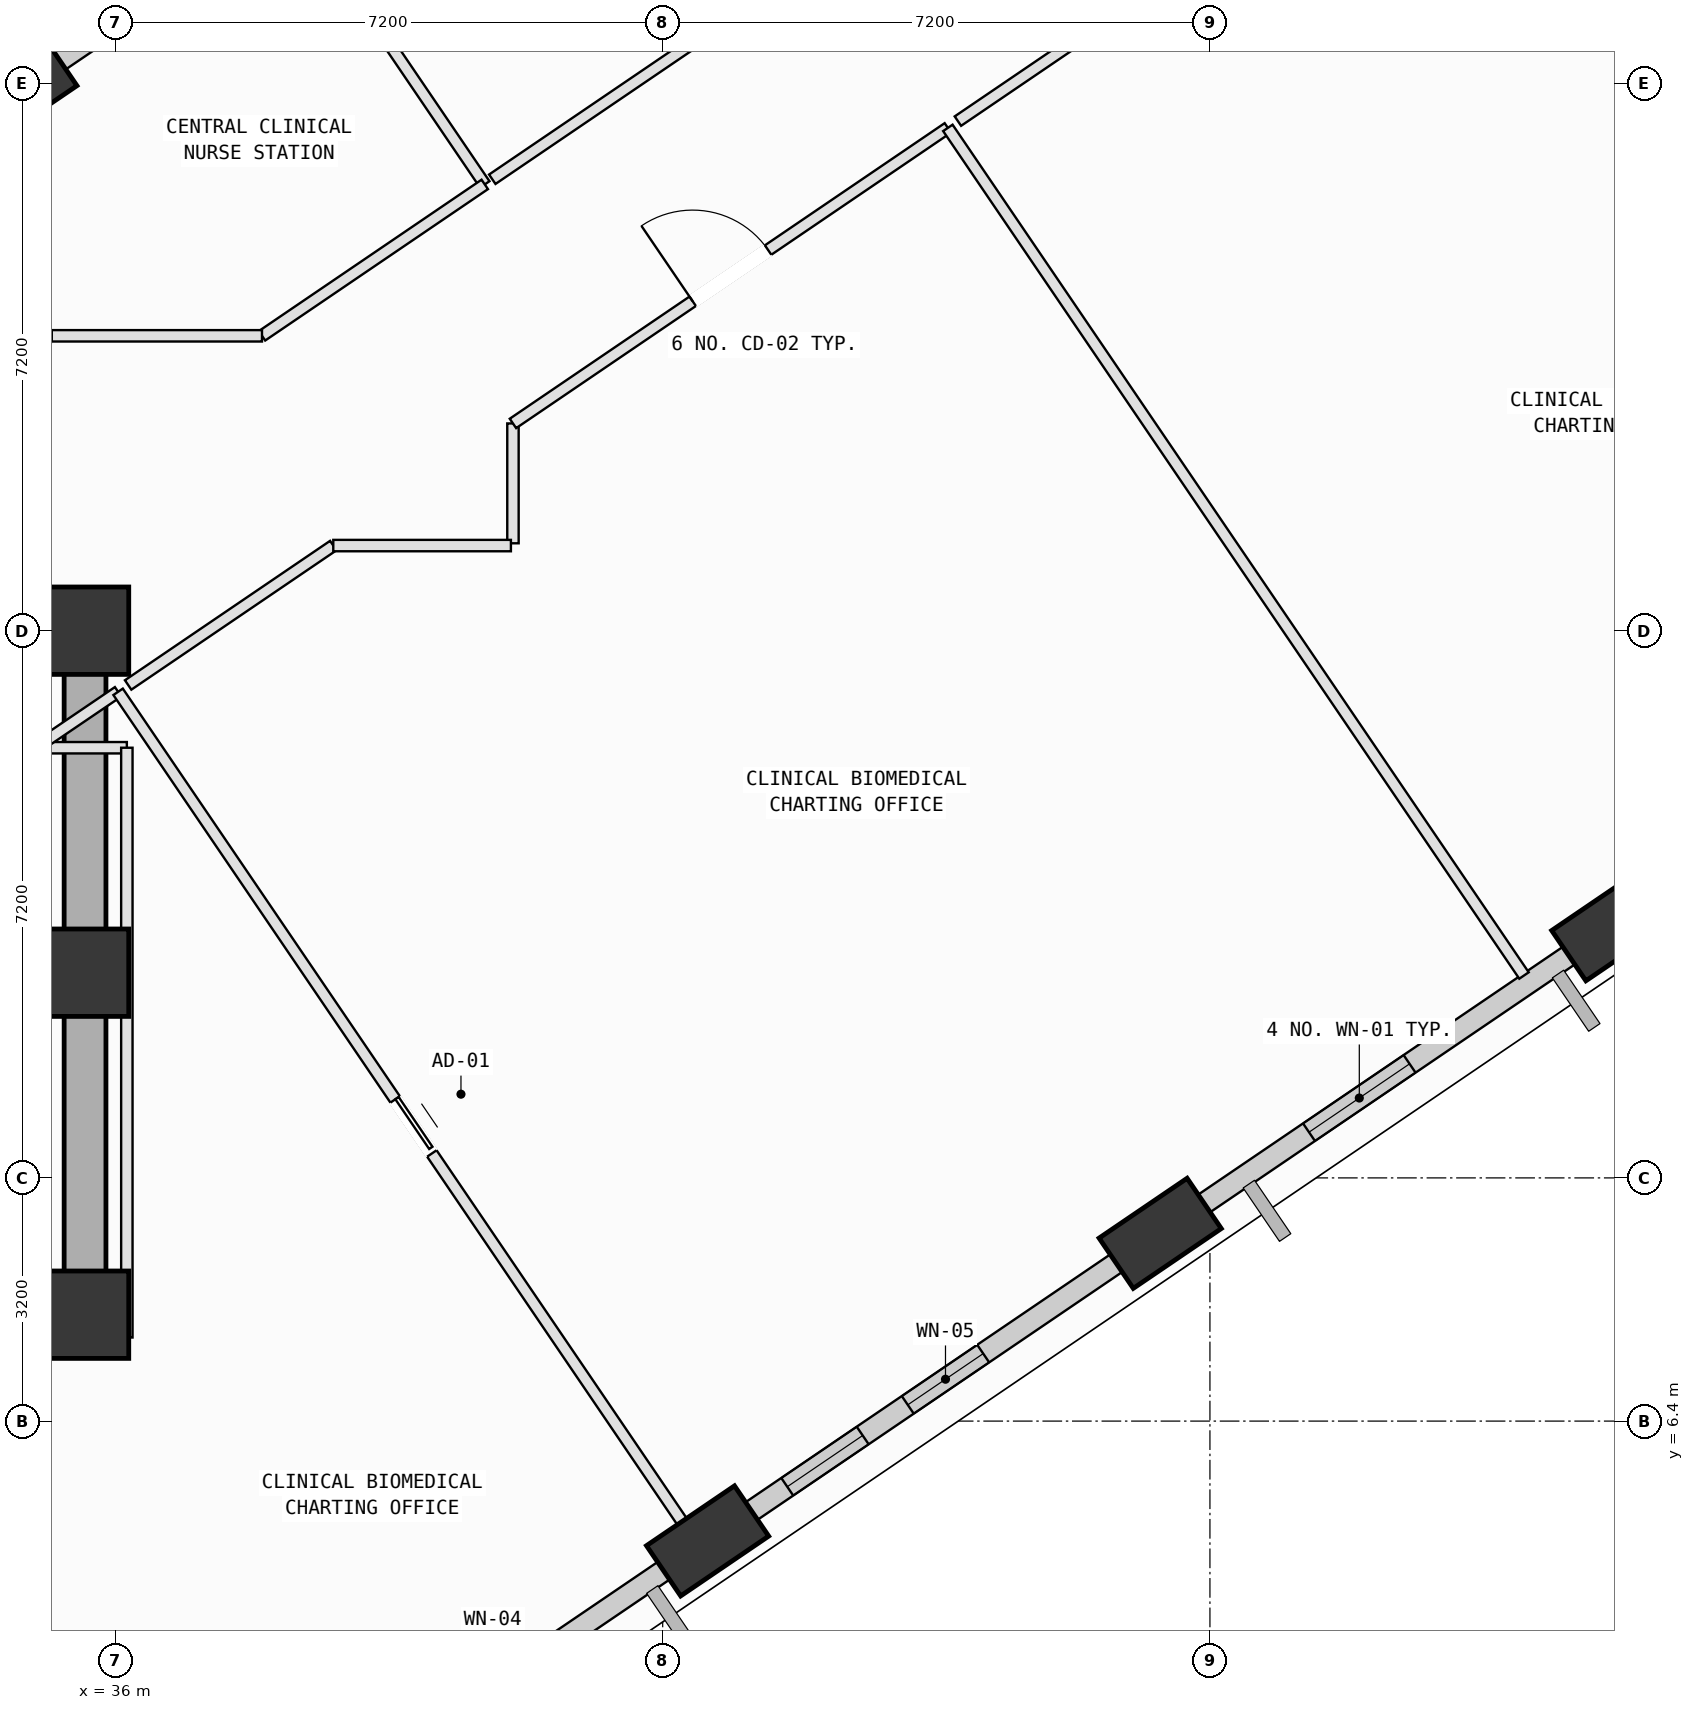
"""IFC4 building model, lengths in metres.
Left out: names, types, materials, properties, quantities, classifications, styles, units other than length and angle.
Written with IfcOpenShell. Run it as: python <this file> out.ifc"""

import sys

from ifc_helpers import new_model, si_unit, direction, frame, frame_2d, origin, origin_2d, place, context, subcontext, project, spatial, rectangle, extrude, element, fill, save


model = new_model("IFC4")
c1 = context("Model", 3, precision=1e-05, world=origin(), true_north=direction((0.0, 1.0)))
c2 = subcontext(c1, "Body", "Model", "MODEL_VIEW")
j1 = project(units=[si_unit("LENGTHUNIT", "METRE"), si_unit("PLANEANGLEUNIT", "RADIAN")], contexts=[c1])
p1 = place(None, origin())
s1 = spatial("IfcSite", under=j1, at=p1, CompositionType="ELEMENT")
p2 = place(p1, origin())
s2 = spatial("IfcBuilding", under=s1, at=p2, CompositionType="ELEMENT")
p3 = place(p2, frame((0.0, 0.0, 169.8)))
s3 = spatial("IfcBuildingStorey", under=s2, at=p3, CompositionType="ELEMENT", Elevation=169.8)
for number, where, z_axis, x_axis in (
    (1, (35.6, 7.8, 0.0), (0.0, 0.0, 1.0), (1.0, 0.0, 0.0)),
    (2, (35.6, 12.3, 0.0), (0.0, 0.0, 1.0), (1.0, 0.0, 0.0)),
    (3, (35.6, 16.8, 0.0), (0.0, 0.0, 1.0), (1.0, 0.0, 0.0)),
):
    element("IfcColumn", number, at=place(p3, frame(where, z_axis=z_axis, x_axis=x_axis)), inside=s3, PredefinedType="COLUMN", context=c2, shape_type="SweptSolid", body=[
        extrude(rectangle(XDim=1.15, YDim=1.15, at=origin_2d()), origin(), (0.0, 0.0, 1.0), 4.0),
    ])
p4 = place(p3, frame((43.791, 4.824, 0.002), z_axis=(0.082058303319, 0.042762777786, 0.995709686451), x_axis=(-0.87854744754, 0.4748149682, 0.052010848805)))
e4 = element("IfcColumn", 4, at=p4, inside=s3, PredefinedType="COLUMN", context=c2, shape_type="SweptSolid", body=[
    extrude(rectangle(XDim=1.4, YDim=0.8, at=origin_2d()), origin(), (0.0, 0.0, 1.0), 4.014),
])
p5 = place(p3, frame((49.746, 8.871, 0.002), z_axis=(0.065202161493, 0.067148494672, 0.995610243921), x_axis=(-0.983217483362, 0.174687404905, 0.05260884887)))
e5 = element("IfcColumn", 5, at=p5, inside=s3, PredefinedType="COLUMN", context=c2, shape_type="SweptSolid", body=[
    extrude(rectangle(XDim=1.4, YDim=0.8, at=origin_2d()), origin(), (0.0, 0.0, 1.0), 4.014),
])
p6 = place(p3, frame((55.701, 12.918, 0.002), z_axis=(0.048185452989, 0.091509826232, 0.994637679672), x_axis=(-0.992304167362, -0.109330716198, 0.058131178649)))
e6 = element("IfcColumn", 6, at=p6, inside=s3, PredefinedType="COLUMN", context=c2, shape_type="SweptSolid", body=[
    extrude(rectangle(XDim=1.4, YDim=0.8, at=origin_2d()), origin(), (0.0, 0.0, 1.0), 4.018),
])
p7 = place(p3, frame((34.69, 23.908, 0.002), z_axis=(0.003665402111, 0.004581752639, 0.999982786037), x_axis=(-0.996966081453, 0.077767316045, 0.003298027747)))
e7 = element("IfcColumn", 7, at=p7, inside=s3, PredefinedType="COLUMN", context=c2, shape_type="SweptSolid", body=[
    extrude(rectangle(XDim=1.4, YDim=0.8, at=origin_2d()), origin(), (0.0, 0.0, 1.0), 3.996),
])
p8 = place(p3, frame((43.533, 4.649, 0.0), z_axis=(0.0, 0.0, 1.0), x_axis=(-0.827079193972, -0.5620854089, 0.0)))
e8 = element("IfcWall", 8, at=p8, inside=s3, PredefinedType="SOLIDWALL", context=c2, shape_type="SweptSolid", body=[
    extrude(rectangle(XDim=6.214, YDim=0.28, at=frame_2d((3.107, 0.0))), origin(), (0.0, 0.0, 1.0), 3.165),
])
p9 = place(p8, frame((2.206, 0.0, 0.75)))
e9 = element("IfcOpeningElement", 9, at=p9, cuts=e8, PredefinedType="OPENING", context=c2, shape_type="SweptSolid", body=[
    extrude(rectangle(XDim=1.8, YDim=2.05, at=frame_2d((0.9, 1.025))), frame((0.0, 0.15, 0.0), z_axis=(0.0, -1.0, 0.0), x_axis=(1.0, 0.0, 0.0)), (0.0, 0.0, 1.0), 0.3),
])
p10 = place(p3, frame((49.489, 8.696, 0.0), z_axis=(0.0, 0.0, 1.0), x_axis=(-0.827074937451, -0.562091672096, 0.0)))
e10 = element("IfcWall", 10, at=p10, inside=s3, PredefinedType="SOLIDWALL", context=c2, shape_type="SweptSolid", body=[
    extrude(rectangle(XDim=6.209, YDim=0.28, at=frame_2d((3.104, 0.0))), origin(), (0.0, 0.0, 1.0), 3.165),
])
p11 = place(p10, frame((2.505, 0.0, 0.75)))
e11 = element("IfcOpeningElement", 11, at=p11, cuts=e10, PredefinedType="OPENING", context=c2, shape_type="SweptSolid", body=[
    extrude(rectangle(XDim=1.2, YDim=1.75, at=frame_2d((0.6, 0.875))), frame((0.0, 0.15, 0.0), z_axis=(0.0, -1.0, 0.0), x_axis=(1.0, 0.0, 0.0)), (0.0, 0.0, 1.0), 0.3),
])
p12 = place(p10, frame((4.422, 0.0, 0.75)))
e12 = element("IfcOpeningElement", 12, at=p12, cuts=e10, PredefinedType="OPENING", context=c2, shape_type="SweptSolid", body=[
    extrude(rectangle(XDim=1.2, YDim=1.75, at=frame_2d((0.6, 0.875))), frame((0.0, 0.15, 0.0), z_axis=(0.0, -1.0, 0.0), x_axis=(1.0, 0.0, 0.0)), (0.0, 0.0, 1.0), 0.3),
])
p13 = place(p3, frame((55.45, 12.747, 0.0), z_axis=(0.0, 0.0, 1.0), x_axis=(-0.827088583616, -0.562071592284, 0.0)))
e13 = element("IfcWall", 13, at=p13, inside=s3, PredefinedType="SOLIDWALL", context=c2, shape_type="SweptSolid", body=[
    extrude(rectangle(XDim=6.218, YDim=0.28, at=frame_2d((3.109, 0.0))), origin(), (0.0, 0.0, 1.0), 3.165),
])
p14 = place(p13, frame((2.93, 0.0, 0.75)))
e14 = element("IfcOpeningElement", 14, at=p14, cuts=e13, PredefinedType="OPENING", context=c2, shape_type="SweptSolid", body=[
    extrude(rectangle(XDim=1.6, YDim=1.95, at=frame_2d((0.8, 0.975))), frame((0.0, 0.15, 0.0), z_axis=(0.0, -1.0, 0.0), x_axis=(1.0, 0.0, 0.0)), (0.0, 0.0, 1.0), 0.3),
])
p15 = place(p3, frame((35.109, 24.194, 0.0), z_axis=(0.0, 0.0, 1.0), x_axis=(0.827087163795, 0.562073681545, 0.0)))
e15 = element("IfcWall", 15, at=p15, inside=s3, PredefinedType="SOLIDWALL", context=c2, shape_type="SweptSolid", body=[
    extrude(rectangle(XDim=3.984, YDim=0.28, at=frame_2d((1.992, 0.0))), origin(), (0.0, 0.0, 1.0), 3.165),
])
p16 = place(p15, frame((1.145, 0.0, 0.75)))
e16 = element("IfcOpeningElement", 16, at=p16, cuts=e15, PredefinedType="OPENING", context=c2, shape_type="SweptSolid", body=[
    extrude(rectangle(XDim=1.4, YDim=1.85, at=frame_2d((0.7, 0.925))), frame((0.0, 0.15, 0.0), z_axis=(0.0, -1.0, 0.0), x_axis=(1.0, 0.0, 0.0)), (0.0, 0.0, 1.0), 0.3),
])
p17 = place(p3, frame((24.8, 7.8, 0.0), z_axis=(0.0, 0.0, 1.0), x_axis=(1.0, 0.0, 0.0)))
e17 = element("IfcWall", 17, at=p17, inside=s3, PredefinedType="SHEAR", context=c2, shape_type="SweptSolid", body=[
    extrude(rectangle(XDim=10.8, YDim=0.55, at=frame_2d((5.4, 0.0))), origin(), (0.0, 0.0, 1.0), 3.78),
])
p18 = place(p3, frame((35.6, 7.8, 0.0), z_axis=(0.0, 0.0, 1.0), x_axis=(0.0, 1.0, 0.0)))
e18 = element("IfcWall", 18, at=p18, inside=s3, PredefinedType="SHEAR", context=c2, shape_type="SweptSolid", body=[
    extrude(rectangle(XDim=9.0, YDim=0.55, at=frame_2d((4.5, 0.0))), origin(), (0.0, 0.0, 1.0), 3.78),
])
p19 = place(p3, frame((36.15, 15.26, 0.0), z_axis=(0.0, 0.0, 1.0), x_axis=(-1.0, 0.0, 0.0)))
e19 = element("IfcWall", 19, at=p19, inside=s3, PredefinedType="PARTITIONING", context=c2, shape_type="SweptSolid", body=[
    extrude(rectangle(XDim=1.199, YDim=0.15, at=frame_2d((0.6, 0.0))), origin(), (0.0, 0.0, 1.0), 3.78),
])
p20 = place(p3, frame((34.951, 15.26, 0.0), z_axis=(0.0, 0.0, 1.0), x_axis=(0.827290216258, 0.561774775229, 0.0)))
e20 = element("IfcWall", 20, at=p20, inside=s3, PredefinedType="PARTITIONING", context=c2, shape_type="SweptSolid", body=[
    extrude(rectangle(XDim=1.31, YDim=0.15, at=frame_2d((0.655, 0.0))), origin(), (0.0, 0.0, 1.0), 3.78),
])
p21 = place(p3, frame((36.035, 15.996, 0.0), z_axis=(0.0, 0.0, 1.0), x_axis=(0.562080635052, -0.827082438273, 0.0)))
e21 = element("IfcWall", 21, at=p21, inside=s3, PredefinedType="PARTITIONING", context=c2, shape_type="SweptSolid", body=[
    extrude(rectangle(XDim=13.829, YDim=0.15, at=frame_2d((6.915, 0.0))), origin(), (0.0, 0.0, 1.0), 3.78),
])
p22 = place(p21, frame((6.485, 0.0, 0.0)))
e22 = element("IfcOpeningElement", 22, at=p22, cuts=e21, PredefinedType="OPENING", context=c2, shape_type="SweptSolid", body=[
    extrude(rectangle(XDim=0.86, YDim=2.06, at=frame_2d((0.43, 1.03))), frame((0.0, 0.085, 0.0), z_axis=(0.0, -1.0, 0.0), x_axis=(1.0, 0.0, 0.0)), (0.0, 0.0, 1.0), 0.17),
])
p23 = place(p3, frame((35.6, 7.5, 0.0), z_axis=(0.0, 0.0, 1.0), x_axis=(1.0, 0.0, 0.0)))
e23 = element("IfcWall", 23, at=p23, inside=s3, PredefinedType="PARTITIONING", context=c2, shape_type="SweptSolid", body=[
    extrude(rectangle(XDim=0.55, YDim=0.15, at=frame_2d((0.275, 0.0))), origin(), (0.0, 0.0, 1.0), 3.065),
])
p24 = place(p3, frame((36.15, 7.5, 0.0), z_axis=(0.0, 0.0, 1.0), x_axis=(0.0, 1.0, 0.0)))
e24 = element("IfcWall", 24, at=p24, inside=s3, PredefinedType="PARTITIONING", context=c2, shape_type="SweptSolid", body=[
    extrude(rectangle(XDim=7.76, YDim=0.15, at=frame_2d((3.88, 0.0))), origin(), (0.0, 0.0, 1.0), 3.065),
])
p25 = place(p3, frame((41.23, 17.95, 0.0), z_axis=(0.0, 0.0, 1.0), x_axis=(0.0, 1.0, 0.0)))
e25 = element("IfcWall", 25, at=p25, inside=s3, PredefinedType="PARTITIONING", context=c2, shape_type="SweptSolid", body=[
    extrude(rectangle(XDim=1.577, YDim=0.15, at=frame_2d((0.789, 0.0))), origin(), (0.0, 0.0, 1.0), 3.78),
])
p26 = place(p3, frame((41.23, 19.527, 0.0), z_axis=(0.0, 0.0, 1.0), x_axis=(0.827060374775, 0.562113099364, 0.0)))
e26 = element("IfcWall", 26, at=p26, inside=s3, PredefinedType="PARTITIONING", context=c2, shape_type="SweptSolid", body=[
    extrude(rectangle(XDim=6.918, YDim=0.15, at=frame_2d((3.459, 0.0))), origin(), (0.0, 0.0, 1.0), 3.065),
])
p27 = place(p26, frame((2.859, 0.0, 0.0)))
e27 = element("IfcOpeningElement", 27, at=p27, cuts=e26, PredefinedType="OPENING", context=c2, shape_type="SweptSolid", body=[
    extrude(rectangle(XDim=1.2, YDim=2.15, at=frame_2d((0.6, 1.075))), frame((0.0, 0.085, 0.0), z_axis=(0.0, -1.0, 0.0), x_axis=(1.0, 0.0, 0.0)), (0.0, 0.0, 1.0), 0.17),
])
p28 = place(p3, frame((46.952, 23.416, 0.0), z_axis=(0.0, 0.0, 1.0), x_axis=(0.562106478049, -0.827064874926, 0.0)))
e28 = element("IfcWall", 28, at=p28, inside=s3, PredefinedType="PARTITIONING", context=c2, shape_type="SweptSolid", body=[
    extrude(rectangle(XDim=13.485, YDim=0.15, at=frame_2d((6.743, 0.0))), origin(), (0.0, 0.0, 1.0), 3.415),
])
p29 = place(p3, frame((50.436, 9.062, 0.0), z_axis=(0.0, 0.0, 1.0), x_axis=(-0.827119270634, -0.562026433672, 0.0)))
e29 = element("IfcWall", 29, at=p29, inside=s3, PredefinedType="PARTITIONING", context=c2, shape_type="SweptSolid", body=[
    extrude(rectangle(XDim=0.989, YDim=0.15, at=frame_2d((0.495, 0.0))), origin(), (0.0, 0.0, 1.0), 3.165),
])
p30 = place(p3, frame((44.483, 5.016, 0.0), z_axis=(0.0, 0.0, 1.0), x_axis=(-0.826981827203, -0.562228652307, 0.0)))
e30 = element("IfcWall", 30, at=p30, inside=s3, PredefinedType="PARTITIONING", context=c2, shape_type="SweptSolid", body=[
    extrude(rectangle(XDim=0.656, YDim=0.15, at=frame_2d((0.328, 0.0))), origin(), (0.0, 0.0, 1.0), 3.165),
])
p31 = place(p3, frame((36.167, 16.086, 0.0), z_axis=(0.0, 0.0, 1.0), x_axis=(0.827114319799, 0.562033719614, 0.0)))
e31 = element("IfcWall", 31, at=p31, inside=s3, PredefinedType="PARTITIONING", context=c2, shape_type="SweptSolid", body=[
    extrude(rectangle(XDim=3.263, YDim=0.15, at=frame_2d((1.632, 0.0))), origin(), (0.0, 0.0, 1.0), 3.78),
])
p32 = place(p3, frame((38.866, 17.92, 0.0), z_axis=(0.0, 0.0, 1.0), x_axis=(1.0, 0.0, 0.0)))
e32 = element("IfcWall", 32, at=p32, inside=s3, PredefinedType="PARTITIONING", context=c2, shape_type="SweptSolid", body=[
    extrude(rectangle(XDim=2.337, YDim=0.15, at=frame_2d((1.168, 0.0))), origin(), (0.0, 0.0, 1.0), 3.78),
])
p33 = place(p3, frame((47.084, 23.505, 0.0), z_axis=(0.0, 0.0, 1.0), x_axis=(0.827050244117, 0.562128004734, 0.0)))
e33 = element("IfcWall", 33, at=p33, inside=s3, PredefinedType="PARTITIONING", context=c2, shape_type="SweptSolid", body=[
    extrude(rectangle(XDim=10.64, YDim=0.15, at=frame_2d((5.32, 0.0))), origin(), (0.0, 0.0, 1.0), 3.78),
])
p34 = place(p33, frame((4.72, 0.0, 0.0)))
e34 = element("IfcOpeningElement", 34, at=p34, cuts=e33, PredefinedType="OPENING", context=c2, shape_type="SweptSolid", body=[
    extrude(rectangle(XDim=1.2, YDim=2.15, at=frame_2d((0.6, 1.075))), frame((0.0, 0.085, 0.0), z_axis=(0.0, -1.0, 0.0), x_axis=(1.0, 0.0, 0.0)), (0.0, 0.0, 1.0), 0.17),
])
p35 = place(p3, frame((56.384, 13.104, 0.0), z_axis=(0.0, 0.0, 1.0), x_axis=(-0.827038460585, -0.562145341271, 0.0)))
e35 = element("IfcWall", 35, at=p35, inside=s3, PredefinedType="PARTITIONING", context=c2, shape_type="SweptSolid", body=[
    extrude(rectangle(XDim=0.973, YDim=0.15, at=frame_2d((0.487, 0.0))), origin(), (0.0, 0.0, 1.0), 3.165),
])
p36 = place(p3, frame((29.087, 20.766, 0.0), z_axis=(0.0, 0.0, 1.0), x_axis=(0.82707898546, 0.562085715715, 0.0)))
e36 = element("IfcWall", 36, at=p36, inside=s3, PredefinedType="PARTITIONING", context=c2, shape_type="SweptSolid", body=[
    extrude(rectangle(XDim=10.808, YDim=0.15, at=frame_2d((5.404, 0.0))), origin(), (0.0, 0.0, 1.0), 3.78),
])
p37 = place(p3, frame((39.454, 24.74, 0.0), z_axis=(0.0, 0.0, 1.0), x_axis=(0.561935992116, -0.827180718322, 0.0)))
e37 = element("IfcWall", 37, at=p37, inside=s3, PredefinedType="PARTITIONING", context=c2, shape_type="SweptSolid", body=[
    extrude(rectangle(XDim=2.5, YDim=0.15, at=frame_2d((1.25, 0.0))), origin(), (0.0, 0.0, 1.0), 3.78),
])
p38 = place(p3, frame((40.859, 22.672, 0.0), z_axis=(0.0, 0.0, 1.0), x_axis=(-0.827035400528, -0.562149843257, 0.0)))
e38 = element("IfcWall", 38, at=p38, inside=s3, PredefinedType="PARTITIONING", context=c2, shape_type="SweptSolid", body=[
    extrude(rectangle(XDim=3.544, YDim=0.15, at=frame_2d((1.772, 0.0))), origin(), (0.0, 0.0, 1.0), 3.065),
])
p39 = place(p3, frame((37.928, 20.68, 0.0), z_axis=(0.0, 0.0, 1.0), x_axis=(-1.0, 0.0, 0.0)))
e39 = element("IfcWall", 39, at=p39, inside=s3, PredefinedType="PARTITIONING", context=c2, shape_type="SweptSolid", body=[
    extrude(rectangle(XDim=6.731, YDim=0.15, at=frame_2d((3.365, 0.0))), origin(), (0.0, 0.0, 1.0), 3.415),
])
p40 = place(p39, frame((2.765, 0.0, 0.0)))
e40 = element("IfcOpeningElement", 40, at=p40, cuts=e39, PredefinedType="OPENING", context=c2, shape_type="SweptSolid", body=[
    extrude(rectangle(XDim=1.2, YDim=2.15, at=frame_2d((0.6, 1.075))), frame((0.0, 0.085, 0.0), z_axis=(0.0, -1.0, 0.0), x_axis=(1.0, 0.0, 0.0)), (0.0, 0.0, 1.0), 0.17),
])
p41 = place(p3, frame((49.914, 28.826, 0.0), z_axis=(0.0, 0.0, 1.0), x_axis=(-0.827105946098, -0.562046042535, 0.0)))
e41 = element("IfcWall", 41, at=p41, inside=s3, PredefinedType="PARTITIONING", context=c2, shape_type="SweptSolid", body=[
    extrude(rectangle(XDim=10.828, YDim=0.15, at=frame_2d((5.414, 0.0))), origin(), (0.0, 0.0, 1.0), 3.78),
])
p42 = place(p41, frame((4.814, 0.0, 0.0)))
e42 = element("IfcOpeningElement", 42, at=p42, cuts=e41, PredefinedType="OPENING", context=c2, shape_type="SweptSolid", body=[
    extrude(rectangle(XDim=1.2, YDim=2.15, at=frame_2d((0.6, 1.075))), frame((0.0, 0.085, 0.0), z_axis=(0.0, -1.0, 0.0), x_axis=(1.0, 0.0, 0.0)), (0.0, 0.0, 1.0), 0.17),
])
p43 = place(p11, origin())
e43 = element("IfcWindow", 43, at=p43, inside=s3, PartitioningType="SINGLE_PANEL", PredefinedType="WINDOW", context=c2, shape_type="SweptSolid", body=[
    extrude(rectangle(XDim=1.2, YDim=1.75, at=frame_2d((0.6, 0.875))), frame((0.0, 0.03, 0.0), z_axis=(0.0, -1.0, 0.0), x_axis=(1.0, 0.0, 0.0)), (0.0, 0.0, 1.0), 0.06),
])
fill(e11, e43)
p44 = place(p12, origin())
e44 = element("IfcWindow", 44, at=p44, inside=s3, PartitioningType="SINGLE_PANEL", PredefinedType="WINDOW", context=c2, shape_type="SweptSolid", body=[
    extrude(rectangle(XDim=1.2, YDim=1.75, at=frame_2d((0.6, 0.875))), frame((0.0, 0.03, 0.0), z_axis=(0.0, -1.0, 0.0), x_axis=(1.0, 0.0, 0.0)), (0.0, 0.0, 1.0), 0.06),
])
fill(e12, e44)
p45 = place(p14, origin())
e45 = element("IfcWindow", 45, at=p45, inside=s3, PartitioningType="SINGLE_PANEL", PredefinedType="WINDOW", context=c2, shape_type="SweptSolid", body=[
    extrude(rectangle(XDim=1.6, YDim=1.95, at=frame_2d((0.8, 0.975))), frame((0.0, 0.03, 0.0), z_axis=(0.0, -1.0, 0.0), x_axis=(1.0, 0.0, 0.0)), (0.0, 0.0, 1.0), 0.06),
])
fill(e14, e45)
p46 = place(p27, origin())
e46 = element("IfcDoor", 46, at=p46, inside=s3, OperationType="SINGLE_SWING_LEFT", PredefinedType="DOOR", context=c2, shape_type="SweptSolid", body=[
    extrude(rectangle(XDim=1.2, YDim=2.15, at=frame_2d((0.6, 1.075))), frame((0.0, 0.025, 0.0), z_axis=(0.0, -1.0, 0.0), x_axis=(1.0, 0.0, 0.0)), (0.0, 0.0, 1.0), 0.05),
])
fill(e27, e46)
p47 = place(p22, origin())
e47 = element("IfcDoor", 47, at=p47, inside=s3, OperationType="SLIDING_TO_LEFT", PredefinedType="DOOR", context=c2, shape_type="SweptSolid", body=[
    extrude(rectangle(XDim=0.86, YDim=2.06, at=frame_2d((0.43, 1.03))), frame((0.0, 0.025, 0.0), z_axis=(0.0, -1.0, 0.0), x_axis=(1.0, 0.0, 0.0)), (0.0, 0.0, 1.0), 0.05),
])
fill(e22, e47)
save(model, sys.argv[1])
